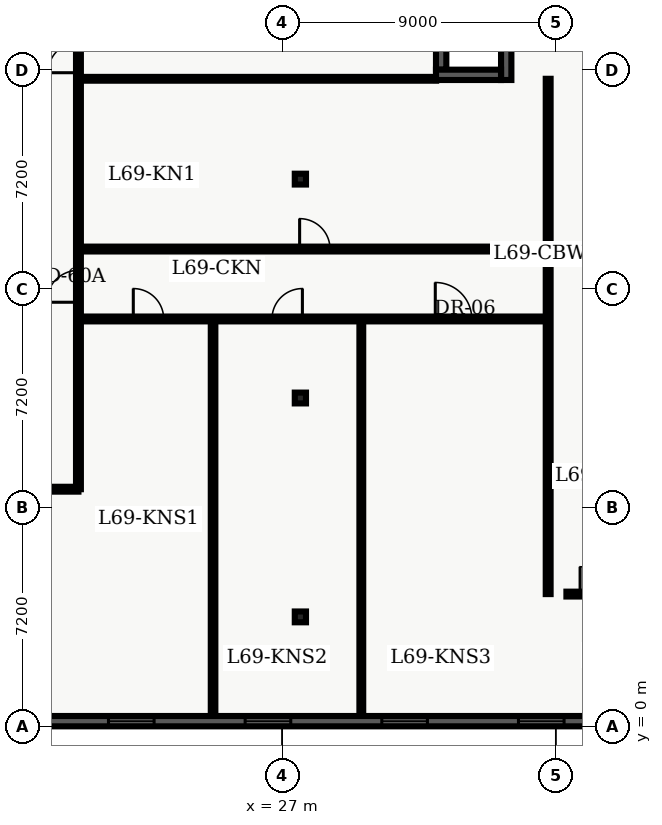
"""IFC4 building model, lengths in metres.
Left out: names, types, materials, properties, quantities, classifications, styles, units other than length and angle.
Written with IfcOpenShell. Run it as: python <this file> out.ifc"""

import sys

from ifc_helpers import new_model, entity, si_unit, converted_unit, direction, frame, origin_with_axes, origin_2d_with_axis, place, context, subcontext, project, spatial, polyline, rectangle, i_section, outline, extrude, element, fill, save


model = new_model("IFC4")
c1 = context("Model", 3, precision=1e-05, world=origin_with_axes(), true_north=direction((0.0, 1.0)))
c2 = subcontext(c1, "Body", "Model", "MODEL_VIEW")
j1 = project(units=[si_unit("LENGTHUNIT", "METRE"), converted_unit("PLANEANGLEUNIT", "DEGREE", entity("IfcPlaneAngleMeasure", 0.017), si_unit("PLANEANGLEUNIT", "RADIAN"), dimensions=[0, 0, 0, 0, 0, 0, 0])], contexts=[c1])
p1 = place(None, origin_with_axes())
s1 = spatial("IfcSite", under=j1, at=p1, CompositionType="ELEMENT")
p2 = place(p1, origin_with_axes())
s2 = spatial("IfcBuilding", under=s1, at=p2, CompositionType="ELEMENT")
p3 = place(p2, frame((0.0, 0.0, 280.2), z_axis=(0.0, 0.0, 1.0), x_axis=(1.0, 0.0, 0.0)))
s3 = spatial("IfcBuildingStorey", under=s2, at=p3, CompositionType="ELEMENT", Elevation=280.2)
for number, where, z_axis, x_axis in (
    (1, (27.6, 3.6, 0.0), (0.0, 0.0, 1.0), (1.0, 0.0, 0.0)),
    (2, (27.6, 10.8, 0.0), (0.0, 0.0, 1.0), (1.0, 0.0, 0.0)),
    (3, (27.6, 18.0, 0.0), (0.0, 0.0, 1.0), (1.0, 0.0, 0.0)),
):
    element("IfcColumn", number, at=place(p3, frame(where, z_axis=z_axis, x_axis=x_axis)), inside=s3, PredefinedType="COLUMN", context=c2, shape_type="SweptSolid", body=[
        extrude(i_section(OverallWidth=0.369, OverallDepth=0.356, WebThickness=0.011, FlangeThickness=0.018, FilletRadius=0.018, at=origin_2d_with_axis()), origin_with_axes(), (0.0, 0.0, 1.0), 3.9),
    ])
p4 = place(p3, frame((8.135, 7.8, 0.0), z_axis=(0.0, 0.0, 1.0), x_axis=(1.0, 0.0, 0.0)))
e4 = element("IfcWall", 4, at=p4, inside=s3, PredefinedType="PARTITIONING", context=c2, shape_type="SweptSolid", body=[
    extrude(outline(polyline([(0.0, -0.08), (12.165, -0.08), (12.165, 0.08), (0.0, 0.08), (0.0, -0.08)])), origin_with_axes(), (0.0, 0.0, 1.0), 2.7),
])
p5 = place(p4, frame((6.065, 0.0, 0.0), z_axis=(0.0, 0.0, 1.0), x_axis=(1.0, 0.0, 0.0)))
e5 = element("IfcOpeningElement", 5, at=p5, cuts=e4, PredefinedType="OPENING", context=c2, shape_type="SweptSolid", body=[
    extrude(rectangle(XDim=1.0, YDim=0.18, at=origin_2d_with_axis()), origin_with_axes(), (0.0, 0.0, 1.0), 2.15),
])
p6 = place(p3, frame((20.3, 7.8, 0.0), z_axis=(0.0, 0.0, 1.0), x_axis=(0.0, 1.0, 0.0)))
e6 = element("IfcWall", 6, at=p6, inside=s3, PredefinedType="PARTITIONING", context=c2, shape_type="SweptSolid", body=[
    extrude(outline(polyline([(0.0, -0.08), (32.7, -0.08), (32.7, 0.08), (0.0, 0.08), (0.0, -0.08)])), origin_with_axes(), (0.0, 0.0, 1.0), 2.7),
])
p7 = place(p6, frame((14.2, 0.0, 0.0), z_axis=(0.0, 0.0, 1.0), x_axis=(1.0, 0.0, 0.0)))
e7 = element("IfcOpeningElement", 7, at=p7, cuts=e6, PredefinedType="OPENING", context=c2, shape_type="SweptSolid", body=[
    extrude(rectangle(XDim=1.0, YDim=0.18, at=origin_2d_with_axis()), origin_with_axes(), (0.0, 0.0, 1.0), 2.15),
])
p8 = place(p6, frame((18.24, 0.0, 0.0), z_axis=(0.0, 0.0, 1.0), x_axis=(1.0, 0.0, 0.0)))
e8 = element("IfcOpeningElement", 8, at=p8, cuts=e6, PredefinedType="OPENING", context=c2, shape_type="SweptSolid", body=[
    extrude(rectangle(XDim=1.0, YDim=0.18, at=origin_2d_with_axis()), origin_with_axes(), (0.0, 0.0, 1.0), 2.15),
])
p9 = place(p6, frame((22.011, 0.0, 0.0), z_axis=(0.0, 0.0, 1.0), x_axis=(1.0, 0.0, 0.0)))
e9 = element("IfcOpeningElement", 9, at=p9, cuts=e6, PredefinedType="OPENING", context=c2, shape_type="SweptSolid", body=[
    extrude(rectangle(XDim=1.0, YDim=0.18, at=origin_2d_with_axis()), origin_with_axes(), (0.0, 0.0, 1.0), 2.15),
])
p10 = place(p6, frame((25.672, 0.0, 0.0), z_axis=(0.0, 0.0, 1.0), x_axis=(1.0, 0.0, 0.0)))
e10 = element("IfcOpeningElement", 10, at=p10, cuts=e6, PredefinedType="OPENING", context=c2, shape_type="SweptSolid", body=[
    extrude(rectangle(XDim=1.0, YDim=0.18, at=origin_2d_with_axis()), origin_with_axes(), (0.0, 0.0, 1.0), 2.15),
])
p11 = place(p6, frame((6.675, 0.0, 0.0), z_axis=(0.0, 0.0, 1.0), x_axis=(1.0, 0.0, 0.0)))
e11 = element("IfcOpeningElement", 11, at=p11, cuts=e6, PredefinedType="OPENING", context=c2, shape_type="SweptSolid", body=[
    extrude(rectangle(XDim=1.05, YDim=0.18, at=origin_2d_with_axis()), origin_with_axes(), (0.0, 0.0, 1.0), 2.15),
])
p12 = place(p3, frame((20.3, 13.4, 0.0), z_axis=(0.0, 0.0, 1.0), x_axis=(1.0, 0.0, 0.0)))
e12 = element("IfcWall", 12, at=p12, inside=s3, PredefinedType="PARTITIONING", context=c2, shape_type="SweptSolid", body=[
    extrude(outline(polyline([(0.0, -0.08), (15.45, -0.08), (15.45, 0.08), (0.0, 0.08), (0.0, -0.08)])), origin_with_axes(), (0.0, 0.0, 1.0), 2.7),
])
p13 = place(p12, frame((2.304, 0.0, 0.0), z_axis=(0.0, 0.0, 1.0), x_axis=(1.0, 0.0, 0.0)))
e13 = element("IfcOpeningElement", 13, at=p13, cuts=e12, PredefinedType="OPENING", context=c2, shape_type="SweptSolid", body=[
    extrude(rectangle(XDim=1.0, YDim=0.18, at=origin_2d_with_axis()), origin_with_axes(), (0.0, 0.0, 1.0), 2.15),
])
p14 = place(p12, frame((6.866, 0.0, 0.0), z_axis=(0.0, 0.0, 1.0), x_axis=(1.0, 0.0, 0.0)))
e14 = element("IfcOpeningElement", 14, at=p14, cuts=e12, PredefinedType="OPENING", context=c2, shape_type="SweptSolid", body=[
    extrude(rectangle(XDim=1.0, YDim=0.18, at=origin_2d_with_axis()), origin_with_axes(), (0.0, 0.0, 1.0), 2.15),
])
p15 = place(p12, frame((12.337, 0.0, 0.0), z_axis=(0.0, 0.0, 1.0), x_axis=(1.0, 0.0, 0.0)))
e15 = element("IfcOpeningElement", 15, at=p15, cuts=e12, PredefinedType="OPENING", context=c2, shape_type="SweptSolid", body=[
    extrude(rectangle(XDim=1.2, YDim=0.18, at=origin_2d_with_axis()), origin_with_axes(), (0.0, 0.0, 1.0), 2.2),
])
p16 = place(p3, frame((20.3, 15.7, 0.0), z_axis=(0.0, 0.0, 1.0), x_axis=(1.0, 0.0, 0.0)))
e16 = element("IfcWall", 16, at=p16, inside=s3, PredefinedType="PARTITIONING", context=c2, shape_type="SweptSolid", body=[
    extrude(outline(polyline([(0.0, -0.08), (15.45, -0.08), (15.45, 0.08), (0.0, 0.08), (0.0, -0.08)])), origin_with_axes(), (0.0, 0.0, 1.0), 2.7),
])
p17 = place(p16, frame((7.775, 0.0, 0.0), z_axis=(0.0, 0.0, 1.0), x_axis=(1.0, 0.0, 0.0)))
e17 = element("IfcOpeningElement", 17, at=p17, cuts=e16, PredefinedType="OPENING", context=c2, shape_type="SweptSolid", body=[
    extrude(rectangle(XDim=1.0, YDim=0.18, at=origin_2d_with_axis()), origin_with_axes(), (0.0, 0.0, 1.0), 2.15),
])
p18 = place(p3, frame((35.75, 4.35, 0.0), z_axis=(0.0, 0.0, 1.0), x_axis=(0.0, 1.0, 0.0)))
e18 = element("IfcWall", 18, at=p18, inside=s3, PredefinedType="PARTITIONING", context=c2, shape_type="SweptSolid", body=[
    extrude(outline(polyline([(0.0, -0.08), (16.95, -0.08), (16.95, 0.08), (0.0, 0.08), (0.0, -0.08)])), origin_with_axes(), (0.0, 0.0, 1.0), 2.7),
])
p19 = place(p3, frame((24.728, 0.335, 0.0), z_axis=(0.0, 0.0, 1.0), x_axis=(0.0, 1.0, 0.0)))
e19 = element("IfcWall", 19, at=p19, inside=s3, PredefinedType="PARTITIONING", context=c2, shape_type="SweptSolid", body=[
    extrude(outline(polyline([(0.0, -0.075), (12.945, -0.075), (12.945, 0.075), (0.0, 0.075), (0.0, -0.075)])), origin_with_axes(), (0.0, 0.0, 1.0), 2.7),
])
p20 = place(p3, frame((29.604, 0.335, 0.0), z_axis=(0.0, 0.0, 1.0), x_axis=(0.0, 1.0, 0.0)))
e20 = element("IfcWall", 20, at=p20, inside=s3, PredefinedType="PARTITIONING", context=c2, shape_type="SweptSolid", body=[
    extrude(outline(polyline([(0.0, -0.062), (12.945, -0.062), (12.945, 0.062), (0.0, 0.062), (0.0, -0.062)])), origin_with_axes(), (0.0, 0.0, 1.0), 2.7),
])
p21 = place(p3, frame((20.3, 21.3, 0.0), z_axis=(0.0, 0.0, 1.0), x_axis=(1.0, 0.0, 0.0)))
e21 = element("IfcWall", 21, at=p21, inside=s3, PredefinedType="PARTITIONING", context=c2, shape_type="SweptSolid", body=[
    extrude(outline(polyline([(0.0, -0.062), (11.765, -0.062), (11.765, 0.062), (0.0, 0.062), (0.0, -0.062)])), origin_with_axes(), (0.0, 0.0, 1.0), 2.7),
])
p22 = place(p3, frame((36.35, 4.35, 0.0), z_axis=(0.0, 0.0, 1.0), x_axis=(1.0, 0.0, 0.0)))
e22 = element("IfcWall", 22, at=p22, inside=s3, PredefinedType="PARTITIONING", context=c2, shape_type="SweptSolid", body=[
    extrude(outline(polyline([(0.0, -0.08), (3.725, -0.08), (3.725, 0.08), (0.0, 0.08), (0.0, -0.08)])), origin_with_axes(), (0.0, 0.0, 1.0), 2.7),
])
p23 = place(p22, frame((0.9, 0.0, 0.0), z_axis=(0.0, 0.0, 1.0), x_axis=(1.0, 0.0, 0.0)))
e23 = element("IfcOpeningElement", 23, at=p23, cuts=e22, PredefinedType="OPENING", context=c2, shape_type="SweptSolid", body=[
    extrude(rectangle(XDim=0.9, YDim=0.18, at=origin_2d_with_axis()), origin_with_axes(), (0.0, 0.0, 1.0), 2.15),
])
p24 = place(p3, frame((34.37, 21.26, 0.0), z_axis=(0.0, 0.0, 1.0), x_axis=(0.0, 1.0, 0.0)))
e24 = element("IfcWall", 24, at=p24, inside=s3, PredefinedType="SOLIDWALL", context=c2, shape_type="SweptSolid", body=[
    extrude(outline(polyline([(0.0, -0.17), (7.54, -0.17), (7.54, 0.17), (0.0, 0.17), (0.0, -0.17)])), origin_with_axes(), (0.0, 0.0, 1.0), 3.66),
])
p25 = place(p24, frame((3.77, 0.0, 0.45), z_axis=(0.0, 0.0, 1.0), x_axis=(1.0, 0.0, 0.0)))
e25 = element("IfcOpeningElement", 25, at=p25, cuts=e24, PredefinedType="OPENING", context=c2, shape_type="SweptSolid", body=[
    extrude(rectangle(XDim=1.5, YDim=0.36, at=origin_2d_with_axis()), origin_with_axes(), (0.0, 0.0, 1.0), 2.1),
])
p26 = place(p3, frame((47.36, 0.17, 0.0), z_axis=(0.0, 0.0, 1.0), x_axis=(-1.0, 0.0, 0.0)))
e26 = element("IfcWall", 26, at=p26, inside=s3, PredefinedType="SOLIDWALL", context=c2, shape_type="SweptSolid", body=[
    extrude(outline(polyline([(0.0, -0.17), (37.16, -0.17), (37.16, 0.17), (0.0, 0.17), (0.0, -0.17)])), origin_with_axes(), (0.0, 0.0, 1.0), 3.66),
])
p27 = place(p26, frame((2.847, 0.0, 0.45), z_axis=(0.0, 0.0, 1.0), x_axis=(1.0, 0.0, 0.0)))
e27 = element("IfcOpeningElement", 27, at=p27, cuts=e26, PredefinedType="OPENING", context=c2, shape_type="SweptSolid", body=[
    extrude(rectangle(XDim=1.5, YDim=0.36, at=origin_2d_with_axis()), origin_with_axes(), (0.0, 0.0, 1.0), 2.1),
])
p28 = place(p26, frame((7.342, 0.0, 0.45), z_axis=(0.0, 0.0, 1.0), x_axis=(1.0, 0.0, 0.0)))
e28 = element("IfcOpeningElement", 28, at=p28, cuts=e26, PredefinedType="OPENING", context=c2, shape_type="SweptSolid", body=[
    extrude(rectangle(XDim=1.5, YDim=0.36, at=origin_2d_with_axis()), origin_with_axes(), (0.0, 0.0, 1.0), 2.1),
])
p29 = place(p26, frame((11.837, 0.0, 0.45), z_axis=(0.0, 0.0, 1.0), x_axis=(1.0, 0.0, 0.0)))
e29 = element("IfcOpeningElement", 29, at=p29, cuts=e26, PredefinedType="OPENING", context=c2, shape_type="SweptSolid", body=[
    extrude(rectangle(XDim=1.5, YDim=0.36, at=origin_2d_with_axis()), origin_with_axes(), (0.0, 0.0, 1.0), 2.1),
])
p30 = place(p26, frame((16.332, 0.0, 0.45), z_axis=(0.0, 0.0, 1.0), x_axis=(1.0, 0.0, 0.0)))
e30 = element("IfcOpeningElement", 30, at=p30, cuts=e26, PredefinedType="OPENING", context=c2, shape_type="SweptSolid", body=[
    extrude(rectangle(XDim=1.5, YDim=0.36, at=origin_2d_with_axis()), origin_with_axes(), (0.0, 0.0, 1.0), 2.1),
])
p31 = place(p26, frame((20.827, 0.0, 0.45), z_axis=(0.0, 0.0, 1.0), x_axis=(1.0, 0.0, 0.0)))
e31 = element("IfcOpeningElement", 31, at=p31, cuts=e26, PredefinedType="OPENING", context=c2, shape_type="SweptSolid", body=[
    extrude(rectangle(XDim=1.5, YDim=0.36, at=origin_2d_with_axis()), origin_with_axes(), (0.0, 0.0, 1.0), 2.1),
])
p32 = place(p26, frame((25.322, 0.0, 0.45), z_axis=(0.0, 0.0, 1.0), x_axis=(1.0, 0.0, 0.0)))
e32 = element("IfcOpeningElement", 32, at=p32, cuts=e26, PredefinedType="OPENING", context=c2, shape_type="SweptSolid", body=[
    extrude(rectangle(XDim=1.5, YDim=0.36, at=origin_2d_with_axis()), origin_with_axes(), (0.0, 0.0, 1.0), 2.1),
])
p33 = place(p26, frame((29.817, 0.0, 0.45), z_axis=(0.0, 0.0, 1.0), x_axis=(1.0, 0.0, 0.0)))
e33 = element("IfcOpeningElement", 33, at=p33, cuts=e26, PredefinedType="OPENING", context=c2, shape_type="SweptSolid", body=[
    extrude(rectangle(XDim=1.5, YDim=0.36, at=origin_2d_with_axis()), origin_with_axes(), (0.0, 0.0, 1.0), 2.1),
])
p34 = place(p26, frame((34.312, 0.0, 0.45), z_axis=(0.0, 0.0, 1.0), x_axis=(1.0, 0.0, 0.0)))
e34 = element("IfcOpeningElement", 34, at=p34, cuts=e26, PredefinedType="OPENING", context=c2, shape_type="SweptSolid", body=[
    extrude(rectangle(XDim=1.5, YDim=0.36, at=origin_2d_with_axis()), origin_with_axes(), (0.0, 0.0, 1.0), 2.1),
])
p35 = place(p3, frame((32.23, 41.82, 0.0), z_axis=(0.0, 0.0, 1.0), x_axis=(0.0, -1.0, 0.0)))
e35 = element("IfcWall", 35, at=p35, inside=s3, PredefinedType="SOLIDWALL", context=c2, shape_type="SweptSolid", body=[
    extrude(outline(polyline([(0.0, -0.17), (20.22, -0.17), (20.22, 0.17), (0.0, 0.17), (0.0, -0.17)])), origin_with_axes(), (0.0, 0.0, 1.0), 3.66),
])
p36 = place(p35, frame((2.978, 0.0, 0.45), z_axis=(0.0, 0.0, 1.0), x_axis=(1.0, 0.0, 0.0)))
e36 = element("IfcOpeningElement", 36, at=p36, cuts=e35, PredefinedType="OPENING", context=c2, shape_type="SweptSolid", body=[
    extrude(rectangle(XDim=1.5, YDim=0.36, at=origin_2d_with_axis()), origin_with_axes(), (0.0, 0.0, 1.0), 2.1),
])
p37 = place(p35, frame((7.732, 0.0, 0.45), z_axis=(0.0, 0.0, 1.0), x_axis=(1.0, 0.0, 0.0)))
e37 = element("IfcOpeningElement", 37, at=p37, cuts=e35, PredefinedType="OPENING", context=c2, shape_type="SweptSolid", body=[
    extrude(rectangle(XDim=1.5, YDim=0.36, at=origin_2d_with_axis()), origin_with_axes(), (0.0, 0.0, 1.0), 2.1),
])
p38 = place(p35, frame((12.487, 0.0, 0.45), z_axis=(0.0, 0.0, 1.0), x_axis=(1.0, 0.0, 0.0)))
e38 = element("IfcOpeningElement", 38, at=p38, cuts=e35, PredefinedType="OPENING", context=c2, shape_type="SweptSolid", body=[
    extrude(rectangle(XDim=1.5, YDim=0.36, at=origin_2d_with_axis()), origin_with_axes(), (0.0, 0.0, 1.0), 2.1),
])
p39 = place(p3, frame((32.06, 21.43, 0.0), z_axis=(0.0, 0.0, 1.0), x_axis=(1.0, 0.0, 0.0)))
e39 = element("IfcWall", 39, at=p39, inside=s3, PredefinedType="SOLIDWALL", context=c2, shape_type="SweptSolid", body=[
    extrude(outline(polyline([(0.0, -0.17), (2.14, -0.17), (2.14, 0.17), (0.0, 0.17), (0.0, -0.17)])), origin_with_axes(), (0.0, 0.0, 1.0), 3.66),
])
p40 = place(p6, frame((14.2, 0.0, 0.0), z_axis=(0.0, 0.0, 1.0), x_axis=(1.0, 0.0, 0.0)))
e40 = element("IfcDoor", 40, at=p40, inside=s3, OperationType="SINGLE_SWING_LEFT", PredefinedType="DOOR", context=c2, shape_type="SweptSolid", body=[
    extrude(rectangle(XDim=1.0, YDim=0.09, at=origin_2d_with_axis()), origin_with_axes(), (0.0, 0.0, 1.0), 2.15),
])
fill(e7, e40)
p41 = place(p6, frame((6.675, 0.0, 0.0), z_axis=(0.0, 0.0, 1.0), x_axis=(1.0, 0.0, 0.0)))
e41 = element("IfcDoor", 41, at=p41, inside=s3, OperationType="SINGLE_SWING_LEFT", PredefinedType="DOOR", context=c2, shape_type="SweptSolid", body=[
    extrude(rectangle(XDim=1.05, YDim=0.09, at=origin_2d_with_axis()), origin_with_axes(), (0.0, 0.0, 1.0), 2.15),
])
fill(e11, e41)
p42 = place(p12, frame((2.304, 0.0, 0.0), z_axis=(0.0, 0.0, 1.0), x_axis=(1.0, 0.0, 0.0)))
e42 = element("IfcDoor", 42, at=p42, inside=s3, OperationType="SINGLE_SWING_LEFT", PredefinedType="DOOR", context=c2, shape_type="SweptSolid", body=[
    extrude(rectangle(XDim=1.0, YDim=0.09, at=origin_2d_with_axis()), origin_with_axes(), (0.0, 0.0, 1.0), 2.15),
])
fill(e13, e42)
p43 = place(p12, frame((6.866, 0.0, 0.0), z_axis=(0.0, 0.0, 1.0), x_axis=(1.0, 0.0, 0.0)))
e43 = element("IfcDoor", 43, at=p43, inside=s3, OperationType="SINGLE_SWING_RIGHT", PredefinedType="DOOR", context=c2, shape_type="SweptSolid", body=[
    extrude(rectangle(XDim=1.0, YDim=0.09, at=origin_2d_with_axis()), origin_with_axes(), (0.0, 0.0, 1.0), 2.15),
])
fill(e14, e43)
p44 = place(p12, frame((12.337, 0.0, 0.0), z_axis=(0.0, 0.0, 1.0), x_axis=(1.0, 0.0, 0.0)))
e44 = element("IfcDoor", 44, at=p44, inside=s3, OperationType="SINGLE_SWING_LEFT", PredefinedType="DOOR", context=c2, shape_type="SweptSolid", body=[
    extrude(rectangle(XDim=1.2, YDim=0.09, at=origin_2d_with_axis()), origin_with_axes(), (0.0, 0.0, 1.0), 2.2),
])
fill(e15, e44)
p45 = place(p16, frame((7.775, 0.0, 0.0), z_axis=(0.0, 0.0, 1.0), x_axis=(1.0, 0.0, 0.0)))
e45 = element("IfcDoor", 45, at=p45, inside=s3, OperationType="SINGLE_SWING_LEFT", PredefinedType="DOOR", context=c2, shape_type="SweptSolid", body=[
    extrude(rectangle(XDim=1.0, YDim=0.09, at=origin_2d_with_axis()), origin_with_axes(), (0.0, 0.0, 1.0), 2.15),
])
fill(e17, e45)
p46 = place(p22, frame((0.9, 0.0, 0.0), z_axis=(0.0, 0.0, 1.0), x_axis=(1.0, 0.0, 0.0)))
e46 = element("IfcDoor", 46, at=p46, inside=s3, OperationType="SINGLE_SWING_LEFT", PredefinedType="DOOR", context=c2, shape_type="SweptSolid", body=[
    extrude(rectangle(XDim=0.9, YDim=0.09, at=origin_2d_with_axis()), origin_with_axes(), (0.0, 0.0, 1.0), 2.15),
])
fill(e23, e46)
p47 = place(p26, frame((11.837, 0.0, 0.45), z_axis=(0.0, 0.0, 1.0), x_axis=(1.0, 0.0, 0.0)))
e47 = element("IfcWindow", 47, at=p47, inside=s3, PredefinedType="WINDOW", context=c2, shape_type="SweptSolid", body=[
    extrude(rectangle(XDim=1.5, YDim=0.09, at=origin_2d_with_axis()), origin_with_axes(), (0.0, 0.0, 1.0), 2.1),
])
fill(e29, e47)
p48 = place(p26, frame((16.332, 0.0, 0.45), z_axis=(0.0, 0.0, 1.0), x_axis=(1.0, 0.0, 0.0)))
e48 = element("IfcWindow", 48, at=p48, inside=s3, PredefinedType="WINDOW", context=c2, shape_type="SweptSolid", body=[
    extrude(rectangle(XDim=1.5, YDim=0.09, at=origin_2d_with_axis()), origin_with_axes(), (0.0, 0.0, 1.0), 2.1),
])
fill(e30, e48)
p49 = place(p26, frame((20.827, 0.0, 0.45), z_axis=(0.0, 0.0, 1.0), x_axis=(1.0, 0.0, 0.0)))
e49 = element("IfcWindow", 49, at=p49, inside=s3, PredefinedType="WINDOW", context=c2, shape_type="SweptSolid", body=[
    extrude(rectangle(XDim=1.5, YDim=0.09, at=origin_2d_with_axis()), origin_with_axes(), (0.0, 0.0, 1.0), 2.1),
])
fill(e31, e49)
p50 = place(p26, frame((25.322, 0.0, 0.45), z_axis=(0.0, 0.0, 1.0), x_axis=(1.0, 0.0, 0.0)))
e50 = element("IfcWindow", 50, at=p50, inside=s3, PredefinedType="WINDOW", context=c2, shape_type="SweptSolid", body=[
    extrude(rectangle(XDim=1.5, YDim=0.09, at=origin_2d_with_axis()), origin_with_axes(), (0.0, 0.0, 1.0), 2.1),
])
fill(e32, e50)
save(model, sys.argv[1])
